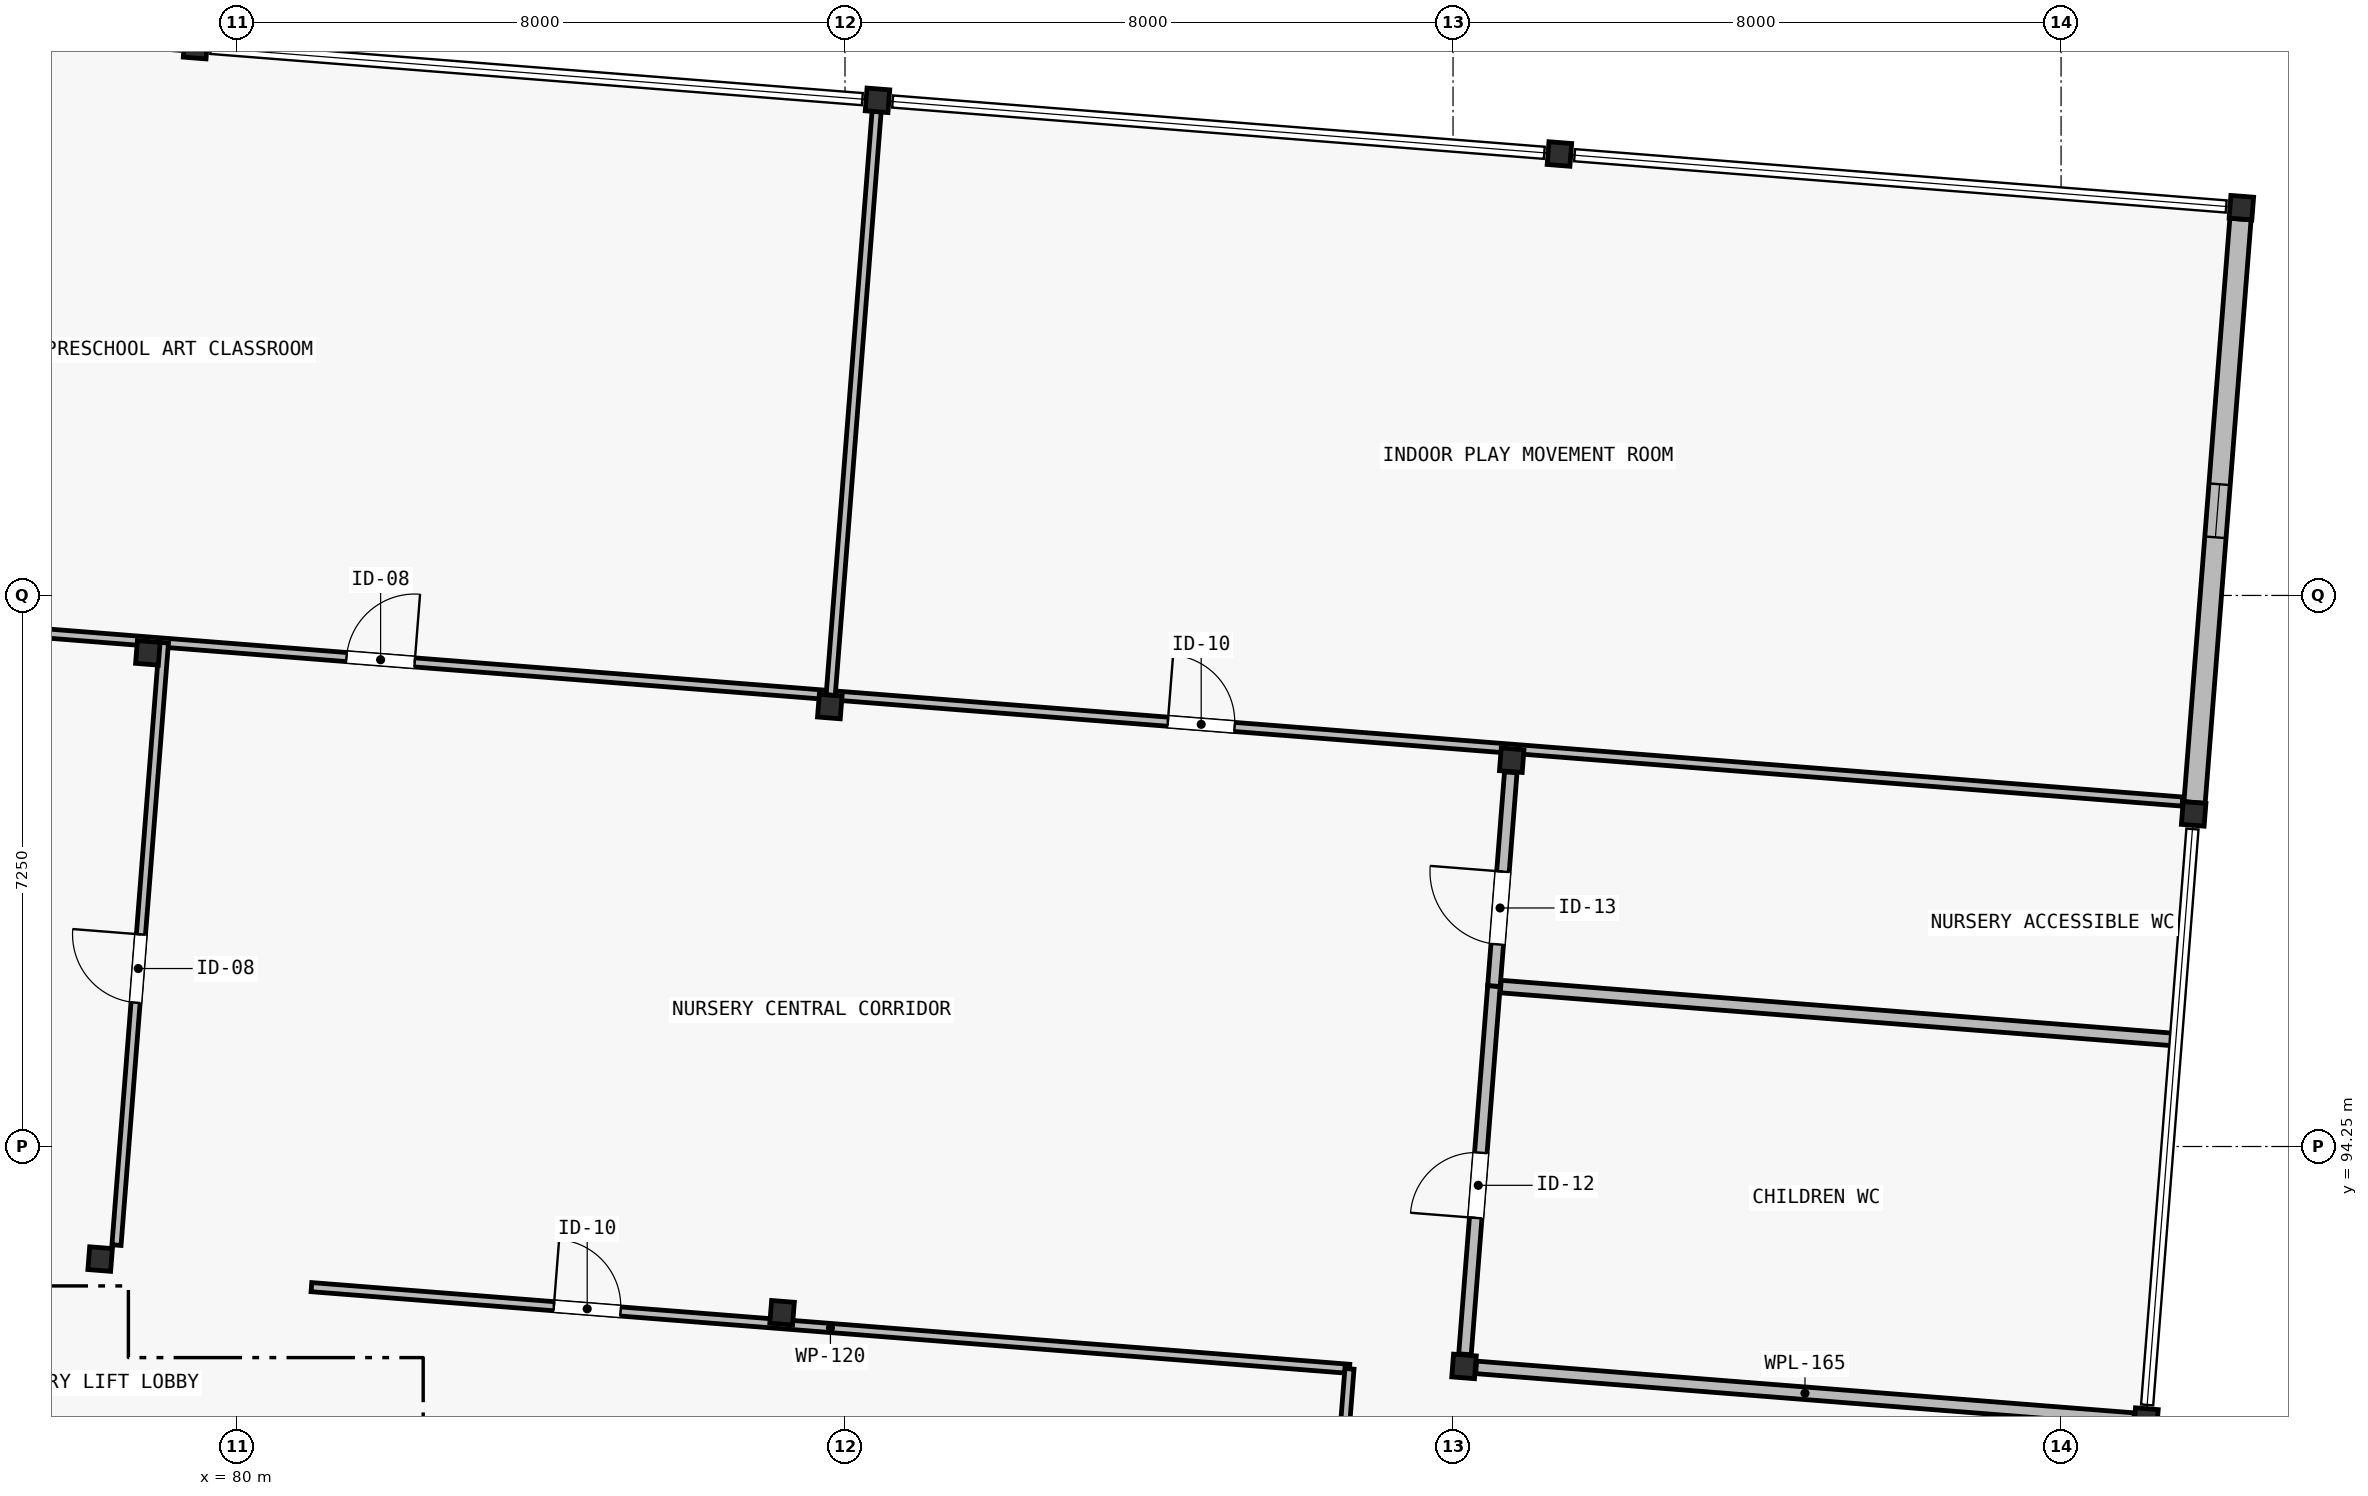
"""IFC4 building model, lengths in metres.
Left out: names, types, materials, properties, quantities, classifications, styles, units other than length and angle.
Written with IfcOpenShell. Run it as: python <this file> out.ifc"""

import sys

from ifc_helpers import new_model, si_unit, direction, frame, frame_2d, origin, origin_2d, place, context, subcontext, project, spatial, rectangle, hollow_rectangle, extrude, element, fill, save


model = new_model("IFC4")
c1 = context("Model", 3, precision=1e-05, world=origin(), true_north=direction((0.0, 1.0)))
c2 = subcontext(c1, "Body", "Model", "MODEL_VIEW")
j1 = project(units=[si_unit("LENGTHUNIT", "METRE"), si_unit("PLANEANGLEUNIT", "RADIAN")], contexts=[c1])
p1 = place(None, origin())
s1 = spatial("IfcSite", under=j1, at=p1, CompositionType="ELEMENT")
p2 = place(p1, origin())
s2 = spatial("IfcBuilding", under=s1, at=p2, CompositionType="ELEMENT")
p3 = place(p2, frame((0.0, 0.0, 8.4)))
s3 = spatial("IfcBuildingStorey", under=s2, at=p3, CompositionType="ELEMENT", Elevation=8.4)
p4 = place(p3, frame((78.2, 92.769, 0.0), z_axis=(0.0, 0.0, 1.0), x_axis=(0.996917333733, -0.078459095728, 0.0)))
e1 = element("IfcColumn", 1, at=p4, inside=s3, PredefinedType="COLUMN", context=c2, shape_type="SweptSolid", body=[
    extrude(hollow_rectangle(XDim=0.3, YDim=0.3, WallThickness=0.016, at=origin_2d()), origin(), (0.0, 0.0, 1.0), 3.854),
])
p5 = place(p3, frame((78.828, 100.745, 0.0), z_axis=(0.0, 0.0, 1.0), x_axis=(0.996917333733, -0.078459095728, 0.0)))
e2 = element("IfcColumn", 2, at=p5, inside=s3, PredefinedType="COLUMN", context=c2, shape_type="SweptSolid", body=[
    extrude(hollow_rectangle(XDim=0.3, YDim=0.3, WallThickness=0.016, at=origin_2d()), origin(), (0.0, 0.0, 1.0), 4.237),
])
p6 = place(p3, frame((79.455, 108.72, 0.0), z_axis=(0.0, 0.0, 1.0), x_axis=(0.996917333733, -0.078459095728, 0.0)))
e3 = element("IfcColumn", 3, at=p6, inside=s3, PredefinedType="COLUMN", context=c2, shape_type="SweptSolid", body=[
    extrude(hollow_rectangle(XDim=0.3, YDim=0.3, WallThickness=0.016, at=origin_2d()), origin(), (0.0, 0.0, 1.0), 4.62),
])
p7 = place(p3, frame((87.172, 92.063, 0.0), z_axis=(0.0, 0.0, 1.0), x_axis=(0.996917333733, -0.078459095728, 0.0)))
e4 = element("IfcColumn", 4, at=p7, inside=s3, PredefinedType="COLUMN", context=c2, shape_type="SweptSolid", body=[
    extrude(hollow_rectangle(XDim=0.3, YDim=0.3, WallThickness=0.016, at=origin_2d()), origin(), (0.0, 0.0, 1.0), 5.253),
])
p8 = place(p3, frame((87.8, 100.038, 0.0), z_axis=(0.0, 0.0, 1.0), x_axis=(0.996917333733, -0.078459095728, 0.0)))
e5 = element("IfcColumn", 5, at=p8, inside=s3, PredefinedType="COLUMN", context=c2, shape_type="SweptSolid", body=[
    extrude(hollow_rectangle(XDim=0.3, YDim=0.3, WallThickness=0.016, at=origin_2d()), origin(), (0.0, 0.0, 1.0), 5.637),
])
p9 = place(p3, frame((88.427, 108.014, 0.0), z_axis=(0.0, 0.0, 1.0), x_axis=(0.996917333733, -0.078459095728, 0.0)))
e6 = element("IfcColumn", 6, at=p9, inside=s3, PredefinedType="COLUMN", context=c2, shape_type="SweptSolid", body=[
    extrude(hollow_rectangle(XDim=0.3, YDim=0.3, WallThickness=0.016, at=origin_2d()), origin(), (0.0, 0.0, 1.0), 6.02),
])
p10 = place(p3, frame((96.145, 91.357, 0.0), z_axis=(0.0, 0.0, 1.0), x_axis=(0.996917333733, -0.078459095728, 0.0)))
e7 = element("IfcColumn", 7, at=p10, inside=s3, PredefinedType="COLUMN", context=c2, shape_type="SweptSolid", body=[
    extrude(hollow_rectangle(XDim=0.3, YDim=0.3, WallThickness=0.016, at=origin_2d()), origin(), (0.0, 0.0, 1.0), 3.953),
])
p11 = place(p3, frame((96.772, 99.332, 0.0), z_axis=(0.0, 0.0, 1.0), x_axis=(0.996917333733, -0.078459095728, 0.0)))
e8 = element("IfcColumn", 8, at=p11, inside=s3, PredefinedType="COLUMN", context=c2, shape_type="SweptSolid", body=[
    extrude(hollow_rectangle(XDim=0.3, YDim=0.3, WallThickness=0.016, at=origin_2d()), origin(), (0.0, 0.0, 1.0), 4.337),
])
p12 = place(p3, frame((97.4, 107.308, 0.0), z_axis=(0.0, 0.0, 1.0), x_axis=(0.996917333733, -0.078459095728, 0.0)))
e9 = element("IfcColumn", 9, at=p12, inside=s3, PredefinedType="COLUMN", context=c2, shape_type="SweptSolid", body=[
    extrude(hollow_rectangle(XDim=0.3, YDim=0.3, WallThickness=0.016, at=origin_2d()), origin(), (0.0, 0.0, 1.0), 4.72),
])
p13 = place(p3, frame((105.117, 90.651, 0.0), z_axis=(0.0, 0.0, 1.0), x_axis=(0.996917333733, -0.078459095728, 0.0)))
e10 = element("IfcColumn", 10, at=p13, inside=s3, PredefinedType="COLUMN", context=c2, shape_type="SweptSolid", body=[
    extrude(hollow_rectangle(XDim=0.3, YDim=0.3, WallThickness=0.016, at=origin_2d()), origin(), (0.0, 0.0, 1.0), 6.053),
])
p14 = place(p3, frame((105.744, 98.626, 0.0), z_axis=(0.0, 0.0, 1.0), x_axis=(0.996917333733, -0.078459095728, 0.0)))
e11 = element("IfcColumn", 11, at=p14, inside=s3, PredefinedType="COLUMN", context=c2, shape_type="SweptSolid", body=[
    extrude(hollow_rectangle(XDim=0.3, YDim=0.3, WallThickness=0.016, at=origin_2d()), origin(), (0.0, 0.0, 1.0), 6.437),
])
p15 = place(p3, frame((106.372, 106.602, 0.0), z_axis=(0.0, 0.0, 1.0), x_axis=(0.996917333733, -0.078459095728, 0.0)))
e12 = element("IfcColumn", 12, at=p15, inside=s3, PredefinedType="COLUMN", context=c2, shape_type="SweptSolid", body=[
    extrude(hollow_rectangle(XDim=0.3, YDim=0.3, WallThickness=0.016, at=origin_2d()), origin(), (0.0, 0.0, 1.0), 6.82),
])
p16 = place(p3, frame((106.36, 106.452, 0.0), z_axis=(0.0, 0.0, 1.0), x_axis=(-0.078473620365, -0.996916190513, 0.0)))
e13 = element("IfcWall", 13, at=p16, inside=s3, PredefinedType="SOLIDWALL", context=c2, shape_type="SweptSolid", body=[
    extrude(rectangle(XDim=7.7, YDim=0.28, at=frame_2d((3.85, 0.0))), origin(), (0.0, 0.0, 1.0), 2.58),
])
p17 = place(p16, frame((3.5, 0.0, 0.2)))
e14 = element("IfcOpeningElement", 14, at=p17, cuts=e13, PredefinedType="OPENING", context=c2, shape_type="SweptSolid", body=[
    extrude(rectangle(XDim=0.7, YDim=2.14, at=frame_2d((0.35, 1.07))), frame((0.0, 0.155, 0.0), z_axis=(0.0, -1.0, 0.0), x_axis=(1.0, 0.0, 0.0)), (0.0, 0.0, 1.0), 0.31),
])
p18 = place(p3, frame((80.979, 92.4, 0.0), z_axis=(0.0, 0.0, 1.0), x_axis=(0.996918352409, -0.078446151144, 0.0)))
e15 = element("IfcWall", 15, at=p18, inside=s3, PredefinedType="PARTITIONING", context=c2, shape_type="SweptSolid", body=[
    extrude(rectangle(XDim=13.7, YDim=0.12, at=frame_2d((6.85, 0.0))), origin(), (0.0, 0.0, 1.0), 2.594),
])
p19 = place(p18, frame((3.2, 0.0, 0.0)))
e16 = element("IfcOpeningElement", 16, at=p19, cuts=e15, PredefinedType="OPENING", context=c2, shape_type="SweptSolid", body=[
    extrude(rectangle(XDim=0.88, YDim=2.1, at=frame_2d((0.44, 1.05))), frame((0.0, 0.075, 0.0), z_axis=(0.0, -1.0, 0.0), x_axis=(1.0, 0.0, 0.0)), (0.0, 0.0, 1.0), 0.15),
])
p20 = place(p3, frame((94.033, 83.649, 0.0), z_axis=(0.0, 0.0, 1.0), x_axis=(0.078442108986, 0.996918670473, 0.0)))
e17 = element("IfcWall", 17, at=p20, inside=s3, PredefinedType="PARTITIONING", context=c2, shape_type="SweptSolid", body=[
    extrude(rectangle(XDim=7.7, YDim=0.12, at=frame_2d((3.85, 0.0))), origin(), (0.0, 0.0, 1.0), 2.98),
])
p21 = place(p3, frame((70.027, 101.588, 0.0), z_axis=(0.0, 0.0, 1.0), x_axis=(0.996917529869, -0.078456603549, 0.0)))
e18 = element("IfcWall", 18, at=p21, inside=s3, PredefinedType="PARTITIONING", context=c2, shape_type="SweptSolid", body=[
    extrude(rectangle(XDim=17.84, YDim=0.12, at=frame_2d((8.92, 0.0))), origin(), (0.0, 0.0, 1.0), 2.594),
])
p22 = place(p21, frame((11.45, 0.0, 0.0)))
e19 = element("IfcOpeningElement", 19, at=p22, cuts=e18, PredefinedType="OPENING", context=c2, shape_type="SweptSolid", body=[
    extrude(rectangle(XDim=0.9, YDim=2.1, at=frame_2d((0.45, 1.05))), frame((0.0, 0.075, 0.0), z_axis=(0.0, -1.0, 0.0), x_axis=(1.0, 0.0, 0.0)), (0.0, 0.0, 1.0), 0.15),
])
p23 = place(p3, frame((87.812, 100.188, 0.0), z_axis=(0.0, 0.0, 1.0), x_axis=(0.996917614105, -0.078455533188, 0.0)))
e20 = element("IfcWall", 20, at=p23, inside=s3, PredefinedType="PARTITIONING", context=c2, shape_type="SweptSolid", body=[
    extrude(rectangle(XDim=17.84, YDim=0.12, at=frame_2d((8.92, 0.0))), origin(), (0.0, 0.0, 1.0), 2.594),
])
p24 = place(p23, frame((4.45, 0.0, 0.0)))
e21 = element("IfcOpeningElement", 21, at=p24, cuts=e20, PredefinedType="OPENING", context=c2, shape_type="SweptSolid", body=[
    extrude(rectangle(XDim=0.88, YDim=2.1, at=frame_2d((0.44, 1.05))), frame((0.0, 0.075, 0.0), z_axis=(0.0, -1.0, 0.0), x_axis=(1.0, 0.0, 0.0)), (0.0, 0.0, 1.0), 0.15),
])
p25 = place(p3, frame((78.415, 92.953, 0.0), z_axis=(0.0, 0.0, 1.0), x_axis=(0.078462345875, 0.996917077936, 0.0)))
e22 = element("IfcWall", 22, at=p25, inside=s3, PredefinedType="PARTITIONING", context=c2, shape_type="SweptSolid", body=[
    extrude(rectangle(XDim=7.95, YDim=0.12, at=frame_2d((3.975, 0.0))), origin(), (0.0, 0.0, 1.0), 2.594),
])
p26 = place(p25, frame((3.2, 0.0, 0.0)))
e23 = element("IfcOpeningElement", 23, at=p26, cuts=e22, PredefinedType="OPENING", context=c2, shape_type="SweptSolid", body=[
    extrude(rectangle(XDim=0.9, YDim=2.1, at=frame_2d((0.45, 1.05))), frame((0.0, 0.075, 0.0), z_axis=(0.0, -1.0, 0.0), x_axis=(1.0, 0.0, 0.0)), (0.0, 0.0, 1.0), 0.15),
])
p27 = place(p3, frame((96.304, 91.344, 0.0), z_axis=(0.0, 0.0, 1.0), x_axis=(0.9969162409, -0.078472980254, 0.0)))
e24 = element("IfcWall", 24, at=p27, inside=s3, PredefinedType="PLUMBINGWALL", context=c2, shape_type="SweptSolid", body=[
    extrude(rectangle(XDim=8.68, YDim=0.165, at=frame_2d((4.34, 0.0))), origin(), (0.0, 0.0, 1.0), 2.594),
])
p28 = place(p3, frame((96.157, 91.516, 0.0), z_axis=(0.0, 0.0, 1.0), x_axis=(0.078463385465, 0.996916996114, 0.0)))
e25 = element("IfcWall", 25, at=p28, inside=s3, PredefinedType="PLUMBINGWALL", context=c2, shape_type="SweptSolid", body=[
    extrude(rectangle(XDim=4.86, YDim=0.165, at=frame_2d((2.43, 0.0))), origin(), (0.0, 0.0, 1.0), 2.594),
])
p29 = place(p28, frame((1.8, 0.0, 0.0)))
e26 = element("IfcOpeningElement", 26, at=p29, cuts=e25, PredefinedType="OPENING", context=c2, shape_type="SweptSolid", body=[
    extrude(rectangle(XDim=0.86, YDim=2.1, at=frame_2d((0.43, 1.05))), frame((0.0, 0.097, 0.0), z_axis=(0.0, -1.0, 0.0), x_axis=(1.0, 0.0, 0.0)), (0.0, 0.0, 1.0), 0.195),
])
p30 = place(p3, frame((96.538, 96.362, 0.0), z_axis=(0.0, 0.0, 1.0), x_axis=(0.078437571766, 0.996919027472, 0.0)))
e27 = element("IfcWall", 27, at=p30, inside=s3, PredefinedType="PLUMBINGWALL", context=c2, shape_type="SweptSolid", body=[
    extrude(rectangle(XDim=2.82, YDim=0.165, at=frame_2d((1.41, 0.0))), origin(), (0.0, 0.0, 1.0), 2.594),
])
p31 = place(p30, frame((0.55, 0.0, 0.0)))
e28 = element("IfcOpeningElement", 28, at=p31, cuts=e27, PredefinedType="OPENING", context=c2, shape_type="SweptSolid", body=[
    extrude(rectangle(XDim=0.96, YDim=2.12, at=frame_2d((0.48, 1.06))), frame((0.0, 0.097, 0.0), z_axis=(0.0, -1.0, 0.0), x_axis=(1.0, 0.0, 0.0)), (0.0, 0.0, 1.0), 0.195),
])
p32 = place(p3, frame((87.812, 100.188, 0.0), z_axis=(0.0, 0.0, 1.0), x_axis=(0.078462944011, 0.996917030859, 0.0)))
e29 = element("IfcWall", 29, at=p32, inside=s3, PredefinedType="PARTITIONING", context=c2, shape_type="SweptSolid", body=[
    extrude(rectangle(XDim=7.81, YDim=0.12, at=frame_2d((3.905, 0.0))), origin(), (0.0, 0.0, 1.0), 2.594),
])
p33 = place(p3, frame((96.628, 96.354, 0.0), z_axis=(0.0, 0.0, 1.0), x_axis=(0.996916420474, -0.078470698917, 0.0)))
e30 = element("IfcWall", 30, at=p33, inside=s3, PredefinedType="PLUMBINGWALL", context=c2, shape_type="SweptSolid", body=[
    extrude(rectangle(XDim=8.87, YDim=0.165, at=frame_2d((4.435, 0.0))), origin(), (0.0, 0.0, 1.0), 2.98),
])
p34 = place(p17, origin())
e31 = element("IfcWindow", 31, at=p34, inside=s3, PartitioningType="SINGLE_PANEL", PredefinedType="WINDOW", context=c2, shape_type="SweptSolid", body=[
    extrude(rectangle(XDim=0.7, YDim=2.14, at=frame_2d((0.35, 1.07))), frame((0.0, 0.03, 0.0), z_axis=(0.0, -1.0, 0.0), x_axis=(1.0, 0.0, 0.0)), (0.0, 0.0, 1.0), 0.06),
])
fill(e14, e31)
p35 = place(p19, origin())
e32 = element("IfcDoor", 32, at=p35, inside=s3, OperationType="SINGLE_SWING_LEFT", PredefinedType="DOOR", context=c2, shape_type="SweptSolid", body=[
    extrude(rectangle(XDim=0.88, YDim=2.1, at=frame_2d((0.44, 1.05))), frame((0.0, 0.025, 0.0), z_axis=(0.0, -1.0, 0.0), x_axis=(1.0, 0.0, 0.0)), (0.0, 0.0, 1.0), 0.05),
])
fill(e16, e32)
p36 = place(p22, origin())
e33 = element("IfcDoor", 33, at=p36, inside=s3, OperationType="SINGLE_SWING_RIGHT", PredefinedType="DOOR", context=c2, shape_type="SweptSolid", body=[
    extrude(rectangle(XDim=0.9, YDim=2.1, at=frame_2d((0.45, 1.05))), frame((0.0, 0.025, 0.0), z_axis=(0.0, -1.0, 0.0), x_axis=(1.0, 0.0, 0.0)), (0.0, 0.0, 1.0), 0.05),
])
fill(e19, e33)
p37 = place(p24, origin())
e34 = element("IfcDoor", 34, at=p37, inside=s3, OperationType="SINGLE_SWING_LEFT", PredefinedType="DOOR", context=c2, shape_type="SweptSolid", body=[
    extrude(rectangle(XDim=0.88, YDim=2.1, at=frame_2d((0.44, 1.05))), frame((0.0, 0.025, 0.0), z_axis=(0.0, -1.0, 0.0), x_axis=(1.0, 0.0, 0.0)), (0.0, 0.0, 1.0), 0.05),
])
fill(e21, e34)
p38 = place(p26, origin())
e35 = element("IfcDoor", 35, at=p38, inside=s3, OperationType="SINGLE_SWING_RIGHT", PredefinedType="DOOR", context=c2, shape_type="SweptSolid", body=[
    extrude(rectangle(XDim=0.9, YDim=2.1, at=frame_2d((0.45, 1.05))), frame((0.0, 0.025, 0.0), z_axis=(0.0, -1.0, 0.0), x_axis=(1.0, 0.0, 0.0)), (0.0, 0.0, 1.0), 0.05),
])
fill(e23, e35)
p39 = place(p29, origin())
e36 = element("IfcDoor", 36, at=p39, inside=s3, OperationType="SINGLE_SWING_LEFT", PredefinedType="DOOR", context=c2, shape_type="SweptSolid", body=[
    extrude(rectangle(XDim=0.86, YDim=2.1, at=frame_2d((0.43, 1.05))), frame((0.0, 0.025, 0.0), z_axis=(0.0, -1.0, 0.0), x_axis=(1.0, 0.0, 0.0)), (0.0, 0.0, 1.0), 0.05),
])
fill(e26, e36)
p40 = place(p31, origin())
e37 = element("IfcDoor", 37, at=p40, inside=s3, OperationType="SINGLE_SWING_RIGHT", PredefinedType="DOOR", context=c2, shape_type="SweptSolid", body=[
    extrude(rectangle(XDim=0.96, YDim=2.12, at=frame_2d((0.48, 1.06))), frame((0.0, 0.025, 0.0), z_axis=(0.0, -1.0, 0.0), x_axis=(1.0, 0.0, 0.0)), (0.0, 0.0, 1.0), 0.05),
])
fill(e28, e37)
save(model, sys.argv[1])
